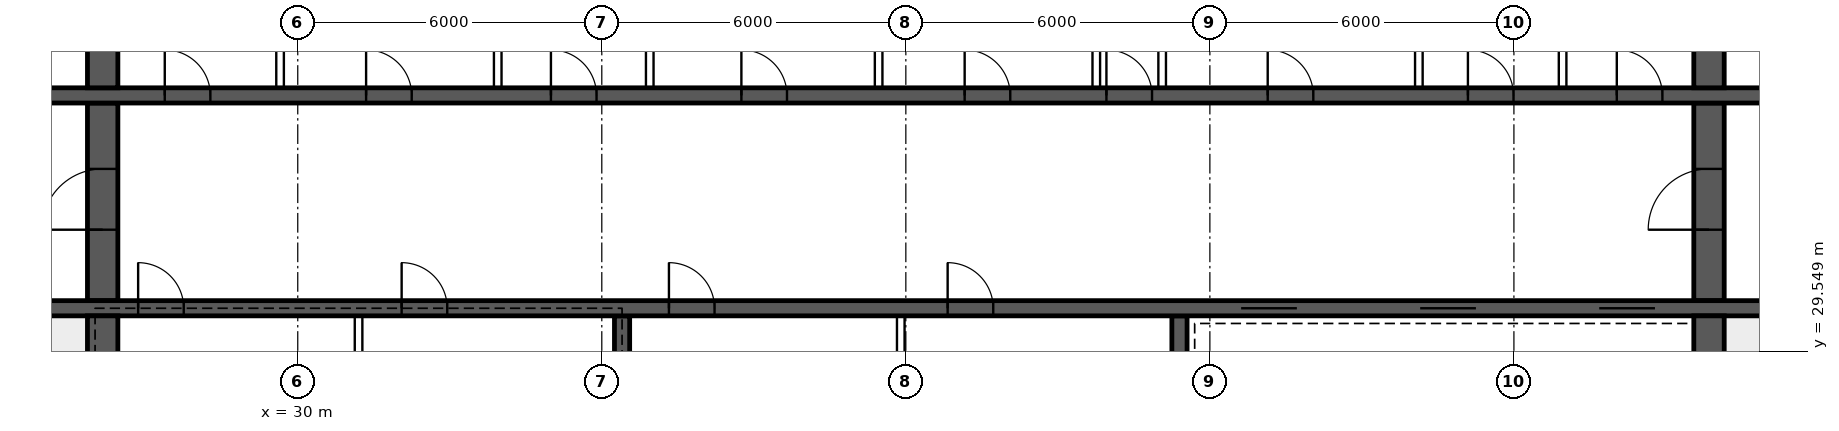
"""IFC4 building model, lengths in metres.
Left out: names, types, materials, properties, quantities, classifications, styles, units other than length and angle.
Written with IfcOpenShell. Run it as: python <this file> out.ifc"""

import sys

from ifc_helpers import new_model, si_unit, direction, frame, frame_2d, origin, place, context, subcontext, project, spatial, rectangle, extrude, element, fill, save


model = new_model("IFC4")
c1 = context("Model", 3, precision=1e-05, world=origin(), true_north=direction((0.0, 1.0)))
c2 = subcontext(c1, "Body", "Model", "MODEL_VIEW")
j1 = project(units=[si_unit("LENGTHUNIT", "METRE"), si_unit("PLANEANGLEUNIT", "RADIAN")], contexts=[c1])
p1 = place(None, origin())
s1 = spatial("IfcSite", under=j1, at=p1, CompositionType="ELEMENT")
p2 = place(p1, origin())
s2 = spatial("IfcBuilding", under=s1, at=p2, CompositionType="ELEMENT")
p3 = place(p2, frame((0.0, 0.0, -9.0)))
s3 = spatial("IfcBuildingStorey", under=s2, at=p3, CompositionType="ELEMENT", Elevation=-9.0)
p4 = place(p3, frame((18.5, 30.4, 0.0), z_axis=(0.0, 0.0, 1.0), x_axis=(1.0, 0.0, 0.0)))
e1 = element("IfcWall", 1, at=p4, inside=s3, PredefinedType="SHEAR", context=c2, shape_type="SweptSolid", body=[
    extrude(rectangle(XDim=47.0, YDim=0.3, at=frame_2d((23.5, 0.0))), origin(), (0.0, 0.0, 1.0), 4.5),
])
p5 = place(p4, frame((0.4, 0.0, 0.0)))
e2 = element("IfcOpeningElement", 2, at=p5, cuts=e1, PredefinedType="OPENING", context=c2, shape_type="SweptSolid", body=[
    extrude(rectangle(XDim=1.0, YDim=2.1, at=frame_2d((0.5, 1.05))), frame((0.0, 0.16, 0.0), z_axis=(0.0, -1.0, 0.0), x_axis=(1.0, 0.0, 0.0)), (0.0, 0.0, 1.0), 0.32),
])
p6 = place(p4, frame((45.6, 0.0, 0.0)))
e3 = element("IfcOpeningElement", 3, at=p6, cuts=e1, PredefinedType="OPENING", context=c2, shape_type="SweptSolid", body=[
    extrude(rectangle(XDim=1.0, YDim=2.1, at=frame_2d((0.5, 1.05))), frame((0.0, 0.16, 0.0), z_axis=(0.0, -1.0, 0.0), x_axis=(1.0, 0.0, 0.0)), (0.0, 0.0, 1.0), 0.32),
])
p7 = place(p4, frame((8.35, 0.0, 0.0)))
e4 = element("IfcOpeningElement", 4, at=p7, cuts=e1, PredefinedType="OPENING", context=c2, shape_type="SweptSolid", body=[
    extrude(rectangle(XDim=0.9, YDim=2.1, at=frame_2d((0.45, 1.05))), frame((0.0, 0.16, 0.0), z_axis=(0.0, -1.0, 0.0), x_axis=(1.0, 0.0, 0.0)), (0.0, 0.0, 1.0), 0.32),
])
p8 = place(p4, frame((13.55, 0.0, 0.0)))
e5 = element("IfcOpeningElement", 5, at=p8, cuts=e1, PredefinedType="OPENING", context=c2, shape_type="SweptSolid", body=[
    extrude(rectangle(XDim=0.9, YDim=2.1, at=frame_2d((0.45, 1.05))), frame((0.0, 0.16, 0.0), z_axis=(0.0, -1.0, 0.0), x_axis=(1.0, 0.0, 0.0)), (0.0, 0.0, 1.0), 0.32),
])
p9 = place(p4, frame((18.825, 0.0, 0.0)))
e6 = element("IfcOpeningElement", 6, at=p9, cuts=e1, PredefinedType="OPENING", context=c2, shape_type="SweptSolid", body=[
    extrude(rectangle(XDim=0.9, YDim=2.1, at=frame_2d((0.45, 1.05))), frame((0.0, 0.16, 0.0), z_axis=(0.0, -1.0, 0.0), x_axis=(1.0, 0.0, 0.0)), (0.0, 0.0, 1.0), 0.32),
])
p10 = place(p4, frame((24.325, 0.0, 0.0)))
e7 = element("IfcOpeningElement", 7, at=p10, cuts=e1, PredefinedType="OPENING", context=c2, shape_type="SweptSolid", body=[
    extrude(rectangle(XDim=0.9, YDim=2.1, at=frame_2d((0.45, 1.05))), frame((0.0, 0.16, 0.0), z_axis=(0.0, -1.0, 0.0), x_axis=(1.0, 0.0, 0.0)), (0.0, 0.0, 1.0), 0.32),
])
p11 = place(p4, frame((30.117, 0.0, 0.0)))
e8 = element("IfcOpeningElement", 8, at=p11, cuts=e1, PredefinedType="OPENING", context=c2, shape_type="SweptSolid", body=[
    extrude(rectangle(XDim=1.1, YDim=2.1, at=frame_2d((0.55, 1.05))), frame((0.0, 0.16, 0.0), z_axis=(0.0, -1.0, 0.0), x_axis=(1.0, 0.0, 0.0)), (0.0, 0.0, 1.0), 0.32),
])
p12 = place(p4, frame((33.65, 0.0, 0.0)))
e9 = element("IfcOpeningElement", 9, at=p12, cuts=e1, PredefinedType="OPENING", context=c2, shape_type="SweptSolid", body=[
    extrude(rectangle(XDim=1.1, YDim=2.1, at=frame_2d((0.55, 1.05))), frame((0.0, 0.16, 0.0), z_axis=(0.0, -1.0, 0.0), x_axis=(1.0, 0.0, 0.0)), (0.0, 0.0, 1.0), 0.32),
])
p13 = place(p4, frame((37.183, 0.0, 0.0)))
e10 = element("IfcOpeningElement", 10, at=p13, cuts=e1, PredefinedType="OPENING", context=c2, shape_type="SweptSolid", body=[
    extrude(rectangle(XDim=1.1, YDim=2.1, at=frame_2d((0.55, 1.05))), frame((0.0, 0.16, 0.0), z_axis=(0.0, -1.0, 0.0), x_axis=(1.0, 0.0, 0.0)), (0.0, 0.0, 1.0), 0.32),
])
p14 = place(p3, frame((18.5, 34.6, 0.0), z_axis=(0.0, 0.0, 1.0), x_axis=(1.0, 0.0, 0.0)))
e11 = element("IfcWall", 11, at=p14, inside=s3, PredefinedType="SHEAR", context=c2, shape_type="SweptSolid", body=[
    extrude(rectangle(XDim=47.0, YDim=0.3, at=frame_2d((23.5, 0.0))), origin(), (0.0, 0.0, 1.0), 4.5),
])
p15 = place(p14, frame((0.9, 0.0, 0.0)))
e12 = element("IfcOpeningElement", 12, at=p15, cuts=e11, PredefinedType="OPENING", context=c2, shape_type="SweptSolid", body=[
    extrude(rectangle(XDim=1.1, YDim=2.1, at=frame_2d((0.55, 1.05))), frame((0.0, 0.16, 0.0), z_axis=(0.0, -1.0, 0.0), x_axis=(1.0, 0.0, 0.0)), (0.0, 0.0, 1.0), 0.32),
])
p16 = place(p14, frame((45.0, 0.0, 0.0)))
e13 = element("IfcOpeningElement", 13, at=p16, cuts=e11, PredefinedType="OPENING", context=c2, shape_type="SweptSolid", body=[
    extrude(rectangle(XDim=1.1, YDim=2.1, at=frame_2d((0.55, 1.05))), frame((0.0, 0.16, 0.0), z_axis=(0.0, -1.0, 0.0), x_axis=(1.0, 0.0, 0.0)), (0.0, 0.0, 1.0), 0.32),
])
p17 = place(p14, frame((4.1, 0.0, 0.0)))
e14 = element("IfcOpeningElement", 14, at=p17, cuts=e11, PredefinedType="OPENING", context=c2, shape_type="SweptSolid", body=[
    extrude(rectangle(XDim=0.9, YDim=2.1, at=frame_2d((0.45, 1.05))), frame((0.0, 0.16, 0.0), z_axis=(0.0, -1.0, 0.0), x_axis=(1.0, 0.0, 0.0)), (0.0, 0.0, 1.0), 0.32),
])
p18 = place(p14, frame((42.0, 0.0, 0.0)))
e15 = element("IfcOpeningElement", 15, at=p18, cuts=e11, PredefinedType="OPENING", context=c2, shape_type="SweptSolid", body=[
    extrude(rectangle(XDim=0.9, YDim=2.1, at=frame_2d((0.45, 1.05))), frame((0.0, 0.16, 0.0), z_axis=(0.0, -1.0, 0.0), x_axis=(1.0, 0.0, 0.0)), (0.0, 0.0, 1.0), 0.32),
])
p19 = place(p14, frame((8.875, 0.0, 0.0)))
e16 = element("IfcOpeningElement", 16, at=p19, cuts=e11, PredefinedType="OPENING", context=c2, shape_type="SweptSolid", body=[
    extrude(rectangle(XDim=0.9, YDim=2.1, at=frame_2d((0.45, 1.05))), frame((0.0, 0.16, 0.0), z_axis=(0.0, -1.0, 0.0), x_axis=(1.0, 0.0, 0.0)), (0.0, 0.0, 1.0), 0.32),
])
p20 = place(p14, frame((12.849, 0.0, 0.0)))
e17 = element("IfcOpeningElement", 17, at=p20, cuts=e11, PredefinedType="OPENING", context=c2, shape_type="SweptSolid", body=[
    extrude(rectangle(XDim=0.9, YDim=2.1, at=frame_2d((0.45, 1.05))), frame((0.0, 0.16, 0.0), z_axis=(0.0, -1.0, 0.0), x_axis=(1.0, 0.0, 0.0)), (0.0, 0.0, 1.0), 0.32),
])
p21 = place(p14, frame((16.496, 0.0, 0.0)))
e18 = element("IfcOpeningElement", 18, at=p21, cuts=e11, PredefinedType="OPENING", context=c2, shape_type="SweptSolid", body=[
    extrude(rectangle(XDim=0.9, YDim=2.1, at=frame_2d((0.45, 1.05))), frame((0.0, 0.16, 0.0), z_axis=(0.0, -1.0, 0.0), x_axis=(1.0, 0.0, 0.0)), (0.0, 0.0, 1.0), 0.32),
])
p22 = place(p14, frame((20.255, 0.0, 0.0)))
e19 = element("IfcOpeningElement", 19, at=p22, cuts=e11, PredefinedType="OPENING", context=c2, shape_type="SweptSolid", body=[
    extrude(rectangle(XDim=0.9, YDim=2.1, at=frame_2d((0.45, 1.05))), frame((0.0, 0.16, 0.0), z_axis=(0.0, -1.0, 0.0), x_axis=(1.0, 0.0, 0.0)), (0.0, 0.0, 1.0), 0.32),
])
p23 = place(p14, frame((24.661, 0.0, 0.0)))
e20 = element("IfcOpeningElement", 20, at=p23, cuts=e11, PredefinedType="OPENING", context=c2, shape_type="SweptSolid", body=[
    extrude(rectangle(XDim=0.9, YDim=2.1, at=frame_2d((0.45, 1.05))), frame((0.0, 0.16, 0.0), z_axis=(0.0, -1.0, 0.0), x_axis=(1.0, 0.0, 0.0)), (0.0, 0.0, 1.0), 0.32),
])
p24 = place(p14, frame((27.458, 0.0, 0.0)))
e21 = element("IfcOpeningElement", 21, at=p24, cuts=e11, PredefinedType="OPENING", context=c2, shape_type="SweptSolid", body=[
    extrude(rectangle(XDim=0.9, YDim=2.1, at=frame_2d((0.45, 1.05))), frame((0.0, 0.16, 0.0), z_axis=(0.0, -1.0, 0.0), x_axis=(1.0, 0.0, 0.0)), (0.0, 0.0, 1.0), 0.32),
])
p25 = place(p14, frame((30.641, 0.0, 0.0)))
e22 = element("IfcOpeningElement", 22, at=p25, cuts=e11, PredefinedType="OPENING", context=c2, shape_type="SweptSolid", body=[
    extrude(rectangle(XDim=0.9, YDim=2.1, at=frame_2d((0.45, 1.05))), frame((0.0, 0.16, 0.0), z_axis=(0.0, -1.0, 0.0), x_axis=(1.0, 0.0, 0.0)), (0.0, 0.0, 1.0), 0.32),
])
p26 = place(p14, frame((34.592, 0.0, 0.0)))
e23 = element("IfcOpeningElement", 23, at=p26, cuts=e11, PredefinedType="OPENING", context=c2, shape_type="SweptSolid", body=[
    extrude(rectangle(XDim=0.9, YDim=2.1, at=frame_2d((0.45, 1.05))), frame((0.0, 0.16, 0.0), z_axis=(0.0, -1.0, 0.0), x_axis=(1.0, 0.0, 0.0)), (0.0, 0.0, 1.0), 0.32),
])
p27 = place(p14, frame((37.53, 0.0, 0.0)))
e24 = element("IfcOpeningElement", 24, at=p27, cuts=e11, PredefinedType="OPENING", context=c2, shape_type="SweptSolid", body=[
    extrude(rectangle(XDim=0.9, YDim=2.1, at=frame_2d((0.45, 1.05))), frame((0.0, 0.16, 0.0), z_axis=(0.0, -1.0, 0.0), x_axis=(1.0, 0.0, 0.0)), (0.0, 0.0, 1.0), 0.32),
])
for number, where, z_axis, x_axis in (
    (25, (26.15, 26.3, 0.0), (0.0, 0.0, 1.0), (0.0, 1.0, 0.0)),
    (26, (57.85, 26.3, 0.0), (0.0, 0.0, 1.0), (0.0, 1.0, 0.0)),
):
    element("IfcWall", number, at=place(p3, frame(where, z_axis=z_axis, x_axis=x_axis)), inside=s3, PredefinedType="SHEAR", context=c2, shape_type="SweptSolid", body=[
        extrude(rectangle(XDim=3.95, YDim=0.6, at=frame_2d((1.975, 0.0))), origin(), (0.0, 0.0, 1.0), 4.5),
    ])
p28 = place(p3, frame((26.15, 30.55, 0.0), z_axis=(0.0, 0.0, 1.0), x_axis=(0.0, 1.0, 0.0)))
e27 = element("IfcWall", 27, at=p28, inside=s3, PredefinedType="SHEAR", context=c2, shape_type="SweptSolid", body=[
    extrude(rectangle(XDim=3.9, YDim=0.6, at=frame_2d((1.95, 0.0))), origin(), (0.0, 0.0, 1.0), 4.5),
])
p29 = place(p28, frame((1.4, 0.0, 0.0)))
e28 = element("IfcOpeningElement", 28, at=p29, cuts=e27, PredefinedType="OPENING", context=c2, shape_type="SweptSolid", body=[
    extrude(rectangle(XDim=1.2, YDim=2.1, at=frame_2d((0.6, 1.05))), frame((0.0, 0.31, 0.0), z_axis=(0.0, -1.0, 0.0), x_axis=(1.0, 0.0, 0.0)), (0.0, 0.0, 1.0), 0.62),
])
p30 = place(p3, frame((57.85, 30.55, 0.0), z_axis=(0.0, 0.0, 1.0), x_axis=(0.0, 1.0, 0.0)))
e29 = element("IfcWall", 29, at=p30, inside=s3, PredefinedType="SHEAR", context=c2, shape_type="SweptSolid", body=[
    extrude(rectangle(XDim=3.9, YDim=0.6, at=frame_2d((1.95, 0.0))), origin(), (0.0, 0.0, 1.0), 4.5),
])
p31 = place(p30, frame((1.4, 0.0, 0.0)))
e30 = element("IfcOpeningElement", 30, at=p31, cuts=e29, PredefinedType="OPENING", context=c2, shape_type="SweptSolid", body=[
    extrude(rectangle(XDim=1.2, YDim=2.1, at=frame_2d((0.6, 1.05))), frame((0.0, 0.31, 0.0), z_axis=(0.0, -1.0, 0.0), x_axis=(1.0, 0.0, 0.0)), (0.0, 0.0, 1.0), 0.62),
])
for number, where, z_axis, x_axis in (
    (31, (26.15, 34.75, 0.0), (0.0, 0.0, 1.0), (0.0, 1.0, 0.0)),
    (32, (57.85, 34.75, 0.0), (0.0, 0.0, 1.0), (0.0, 1.0, 0.0)),
):
    element("IfcWall", number, at=place(p3, frame(where, z_axis=z_axis, x_axis=x_axis)), inside=s3, PredefinedType="SHEAR", context=c2, shape_type="SweptSolid", body=[
        extrude(rectangle(XDim=2.95, YDim=0.6, at=frame_2d((1.475, 0.0))), origin(), (0.0, 0.0, 1.0), 4.5),
    ])
for number, where, z_axis, x_axis in (
    (33, (36.4, 26.3, 0.0), (0.0, 0.0, 1.0), (0.0, 1.0, 0.0)),
    (34, (47.4, 26.3, 0.0), (0.0, 0.0, 1.0), (0.0, 1.0, 0.0)),
):
    element("IfcWall", number, at=place(p3, frame(where, z_axis=z_axis, x_axis=x_axis)), inside=s3, PredefinedType="SHEAR", context=c2, shape_type="SweptSolid", body=[
        extrude(rectangle(XDim=3.95, YDim=0.3, at=frame_2d((1.975, 0.0))), origin(), (0.0, 0.0, 1.0), 4.5),
    ])
for number, where, z_axis, x_axis in (
    (35, (29.651, 34.75, 0.0), (0.0, 0.0, 1.0), (0.0, 1.0, 0.0)),
    (36, (33.946, 34.75, 0.0), (0.0, 0.0, 1.0), (0.0, 1.0, 0.0)),
    (37, (36.946, 34.75, 0.0), (0.0, 0.0, 1.0), (0.0, 1.0, 0.0)),
    (38, (41.463, 34.75, 0.0), (0.0, 0.0, 1.0), (0.0, 1.0, 0.0)),
    (39, (45.758, 34.75, 0.0), (0.0, 0.0, 1.0), (0.0, 1.0, 0.0)),
    (40, (47.058, 34.75, 0.0), (0.0, 0.0, 1.0), (0.0, 1.0, 0.0)),
    (41, (52.124, 34.75, 0.0), (0.0, 0.0, 1.0), (0.0, 1.0, 0.0)),
    (42, (54.961, 34.75, 0.0), (0.0, 0.0, 1.0), (0.0, 1.0, 0.0)),
):
    element("IfcWall", number, at=place(p3, frame(where, z_axis=z_axis, x_axis=x_axis)), inside=s3, PredefinedType="SOLIDWALL", context=c2, shape_type="SweptSolid", body=[
        extrude(rectangle(XDim=2.95, YDim=0.15, at=frame_2d((1.475, 0.0))), origin(), (0.0, 0.0, 1.0), 4.2),
    ])
for number, where, z_axis, x_axis in (
    (43, (31.2, 26.3, 0.0), (0.0, 0.0, 1.0), (0.0, 1.0, 0.0)),
    (44, (41.9, 26.3, 0.0), (0.0, 0.0, 1.0), (0.0, 1.0, 0.0)),
):
    element("IfcWall", number, at=place(p3, frame(where, z_axis=z_axis, x_axis=x_axis)), inside=s3, PredefinedType="SOLIDWALL", context=c2, shape_type="SweptSolid", body=[
        extrude(rectangle(XDim=3.95, YDim=0.15, at=frame_2d((1.975, 0.0))), origin(), (0.0, 0.0, 1.0), 4.2),
    ])
p32 = place(p29, origin())
e45 = element("IfcDoor", 45, at=p32, inside=s3, OperationType="SINGLE_SWING_LEFT", PredefinedType="DOOR", context=c2, shape_type="SweptSolid", body=[
    extrude(rectangle(XDim=1.2, YDim=2.1, at=frame_2d((0.6, 1.05))), frame((0.0, 0.025, 0.0), z_axis=(0.0, -1.0, 0.0), x_axis=(1.0, 0.0, 0.0)), (0.0, 0.0, 1.0), 0.05),
])
fill(e28, e45)
p33 = place(p31, origin())
e46 = element("IfcDoor", 46, at=p33, inside=s3, OperationType="SINGLE_SWING_LEFT", PredefinedType="DOOR", context=c2, shape_type="SweptSolid", body=[
    extrude(rectangle(XDim=1.2, YDim=2.1, at=frame_2d((0.6, 1.05))), frame((0.0, 0.025, 0.0), z_axis=(0.0, -1.0, 0.0), x_axis=(1.0, 0.0, 0.0)), (0.0, 0.0, 1.0), 0.05),
])
fill(e30, e46)
p34 = place(p19, origin())
e47 = element("IfcDoor", 47, at=p34, inside=s3, OperationType="SINGLE_SWING_LEFT", PredefinedType="DOOR", context=c2, shape_type="SweptSolid", body=[
    extrude(rectangle(XDim=0.9, YDim=2.1, at=frame_2d((0.45, 1.05))), frame((0.0, 0.025, 0.0), z_axis=(0.0, -1.0, 0.0), x_axis=(1.0, 0.0, 0.0)), (0.0, 0.0, 1.0), 0.05),
])
fill(e16, e47)
p35 = place(p20, origin())
e48 = element("IfcDoor", 48, at=p35, inside=s3, OperationType="SINGLE_SWING_LEFT", PredefinedType="DOOR", context=c2, shape_type="SweptSolid", body=[
    extrude(rectangle(XDim=0.9, YDim=2.1, at=frame_2d((0.45, 1.05))), frame((0.0, 0.025, 0.0), z_axis=(0.0, -1.0, 0.0), x_axis=(1.0, 0.0, 0.0)), (0.0, 0.0, 1.0), 0.05),
])
fill(e17, e48)
p36 = place(p21, origin())
e49 = element("IfcDoor", 49, at=p36, inside=s3, OperationType="SINGLE_SWING_LEFT", PredefinedType="DOOR", context=c2, shape_type="SweptSolid", body=[
    extrude(rectangle(XDim=0.9, YDim=2.1, at=frame_2d((0.45, 1.05))), frame((0.0, 0.025, 0.0), z_axis=(0.0, -1.0, 0.0), x_axis=(1.0, 0.0, 0.0)), (0.0, 0.0, 1.0), 0.05),
])
fill(e18, e49)
p37 = place(p22, origin())
e50 = element("IfcDoor", 50, at=p37, inside=s3, OperationType="SINGLE_SWING_LEFT", PredefinedType="DOOR", context=c2, shape_type="SweptSolid", body=[
    extrude(rectangle(XDim=0.9, YDim=2.1, at=frame_2d((0.45, 1.05))), frame((0.0, 0.025, 0.0), z_axis=(0.0, -1.0, 0.0), x_axis=(1.0, 0.0, 0.0)), (0.0, 0.0, 1.0), 0.05),
])
fill(e19, e50)
p38 = place(p23, origin())
e51 = element("IfcDoor", 51, at=p38, inside=s3, OperationType="SINGLE_SWING_LEFT", PredefinedType="DOOR", context=c2, shape_type="SweptSolid", body=[
    extrude(rectangle(XDim=0.9, YDim=2.1, at=frame_2d((0.45, 1.05))), frame((0.0, 0.025, 0.0), z_axis=(0.0, -1.0, 0.0), x_axis=(1.0, 0.0, 0.0)), (0.0, 0.0, 1.0), 0.05),
])
fill(e20, e51)
p39 = place(p24, origin())
e52 = element("IfcDoor", 52, at=p39, inside=s3, OperationType="SINGLE_SWING_LEFT", PredefinedType="DOOR", context=c2, shape_type="SweptSolid", body=[
    extrude(rectangle(XDim=0.9, YDim=2.1, at=frame_2d((0.45, 1.05))), frame((0.0, 0.025, 0.0), z_axis=(0.0, -1.0, 0.0), x_axis=(1.0, 0.0, 0.0)), (0.0, 0.0, 1.0), 0.05),
])
fill(e21, e52)
p40 = place(p25, origin())
e53 = element("IfcDoor", 53, at=p40, inside=s3, OperationType="SINGLE_SWING_LEFT", PredefinedType="DOOR", context=c2, shape_type="SweptSolid", body=[
    extrude(rectangle(XDim=0.9, YDim=2.1, at=frame_2d((0.45, 1.05))), frame((0.0, 0.025, 0.0), z_axis=(0.0, -1.0, 0.0), x_axis=(1.0, 0.0, 0.0)), (0.0, 0.0, 1.0), 0.05),
])
fill(e22, e53)
p41 = place(p26, origin())
e54 = element("IfcDoor", 54, at=p41, inside=s3, OperationType="SINGLE_SWING_LEFT", PredefinedType="DOOR", context=c2, shape_type="SweptSolid", body=[
    extrude(rectangle(XDim=0.9, YDim=2.1, at=frame_2d((0.45, 1.05))), frame((0.0, 0.025, 0.0), z_axis=(0.0, -1.0, 0.0), x_axis=(1.0, 0.0, 0.0)), (0.0, 0.0, 1.0), 0.05),
])
fill(e23, e54)
p42 = place(p27, origin())
e55 = element("IfcDoor", 55, at=p42, inside=s3, OperationType="SINGLE_SWING_LEFT", PredefinedType="DOOR", context=c2, shape_type="SweptSolid", body=[
    extrude(rectangle(XDim=0.9, YDim=2.1, at=frame_2d((0.45, 1.05))), frame((0.0, 0.025, 0.0), z_axis=(0.0, -1.0, 0.0), x_axis=(1.0, 0.0, 0.0)), (0.0, 0.0, 1.0), 0.05),
])
fill(e24, e55)
p43 = place(p7, origin())
e56 = element("IfcDoor", 56, at=p43, inside=s3, OperationType="SINGLE_SWING_LEFT", PredefinedType="DOOR", context=c2, shape_type="SweptSolid", body=[
    extrude(rectangle(XDim=0.9, YDim=2.1, at=frame_2d((0.45, 1.05))), frame((0.0, 0.025, 0.0), z_axis=(0.0, -1.0, 0.0), x_axis=(1.0, 0.0, 0.0)), (0.0, 0.0, 1.0), 0.05),
])
fill(e4, e56)
p44 = place(p8, origin())
e57 = element("IfcDoor", 57, at=p44, inside=s3, OperationType="SINGLE_SWING_LEFT", PredefinedType="DOOR", context=c2, shape_type="SweptSolid", body=[
    extrude(rectangle(XDim=0.9, YDim=2.1, at=frame_2d((0.45, 1.05))), frame((0.0, 0.025, 0.0), z_axis=(0.0, -1.0, 0.0), x_axis=(1.0, 0.0, 0.0)), (0.0, 0.0, 1.0), 0.05),
])
fill(e5, e57)
p45 = place(p9, origin())
e58 = element("IfcDoor", 58, at=p45, inside=s3, OperationType="SINGLE_SWING_LEFT", PredefinedType="DOOR", context=c2, shape_type="SweptSolid", body=[
    extrude(rectangle(XDim=0.9, YDim=2.1, at=frame_2d((0.45, 1.05))), frame((0.0, 0.025, 0.0), z_axis=(0.0, -1.0, 0.0), x_axis=(1.0, 0.0, 0.0)), (0.0, 0.0, 1.0), 0.05),
])
fill(e6, e58)
p46 = place(p10, origin())
e59 = element("IfcDoor", 59, at=p46, inside=s3, OperationType="SINGLE_SWING_LEFT", PredefinedType="DOOR", context=c2, shape_type="SweptSolid", body=[
    extrude(rectangle(XDim=0.9, YDim=2.1, at=frame_2d((0.45, 1.05))), frame((0.0, 0.025, 0.0), z_axis=(0.0, -1.0, 0.0), x_axis=(1.0, 0.0, 0.0)), (0.0, 0.0, 1.0), 0.05),
])
fill(e7, e59)
p47 = place(p11, origin())
e60 = element("IfcDoor", 60, at=p47, inside=s3, OperationType="DOUBLE_DOOR_SLIDING", PredefinedType="DOOR", context=c2, shape_type="SweptSolid", body=[
    extrude(rectangle(XDim=1.1, YDim=2.1, at=frame_2d((0.55, 1.05))), frame((0.0, 0.025, 0.0), z_axis=(0.0, -1.0, 0.0), x_axis=(1.0, 0.0, 0.0)), (0.0, 0.0, 1.0), 0.05),
])
fill(e8, e60)
p48 = place(p12, origin())
e61 = element("IfcDoor", 61, at=p48, inside=s3, OperationType="DOUBLE_DOOR_SLIDING", PredefinedType="DOOR", context=c2, shape_type="SweptSolid", body=[
    extrude(rectangle(XDim=1.1, YDim=2.1, at=frame_2d((0.55, 1.05))), frame((0.0, 0.025, 0.0), z_axis=(0.0, -1.0, 0.0), x_axis=(1.0, 0.0, 0.0)), (0.0, 0.0, 1.0), 0.05),
])
fill(e9, e61)
p49 = place(p13, origin())
e62 = element("IfcDoor", 62, at=p49, inside=s3, OperationType="DOUBLE_DOOR_SLIDING", PredefinedType="DOOR", context=c2, shape_type="SweptSolid", body=[
    extrude(rectangle(XDim=1.1, YDim=2.1, at=frame_2d((0.55, 1.05))), frame((0.0, 0.025, 0.0), z_axis=(0.0, -1.0, 0.0), x_axis=(1.0, 0.0, 0.0)), (0.0, 0.0, 1.0), 0.05),
])
fill(e10, e62)
save(model, sys.argv[1])
